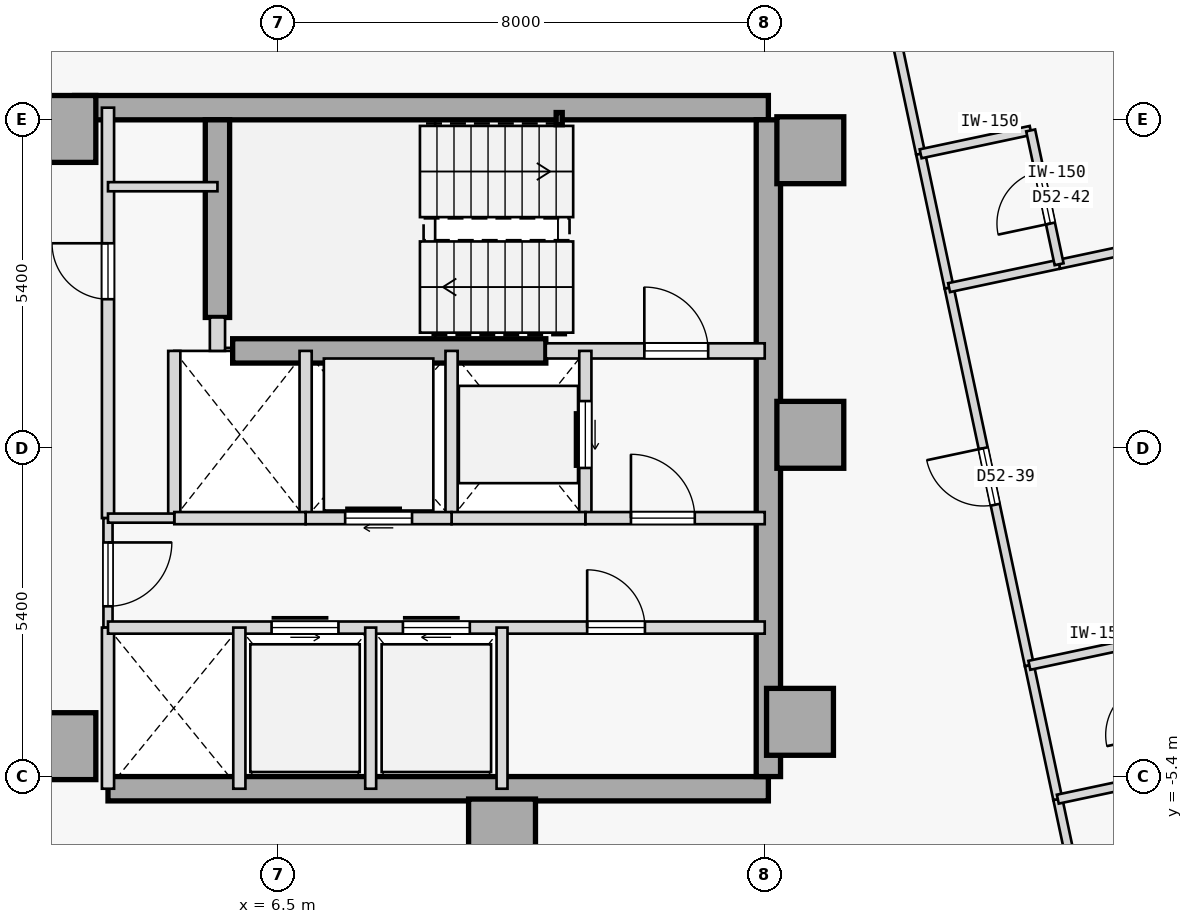
"""IFC4 building model, lengths in metres.
Left out: names, types, materials, properties, quantities, classifications, styles, units other than length and angle.
Written with IfcOpenShell. Run it as: python <this file> out.ifc"""

import sys

from ifc_helpers import new_model, si_unit, direction, frame, frame_2d, origin, origin_2d, place, context, subcontext, project, spatial, rectangle, hollow_rectangle, extrude, element, fill, save


model = new_model("IFC4")
c1 = context("Model", 3, precision=1e-05, world=origin(), true_north=direction((0.0, 1.0)))
c2 = subcontext(c1, "Body", "Model", "MODEL_VIEW")
j1 = project(units=[si_unit("LENGTHUNIT", "METRE"), si_unit("PLANEANGLEUNIT", "RADIAN")], contexts=[c1])
p1 = place(None, origin())
s1 = spatial("IfcSite", under=j1, at=p1, CompositionType="ELEMENT")
p2 = place(p1, origin())
s2 = spatial("IfcBuilding", under=s1, at=p2, CompositionType="ELEMENT")
p3 = place(p2, frame((0.0, 0.0, 199.0)))
s3 = spatial("IfcBuildingStorey", under=s2, at=p3, CompositionType="ELEMENT", Elevation=199.0)
for number, where, z_axis, x_axis in (
    (1, (15.25, 4.9, 0.0), (0.0, 0.0, 1.0), (1.0, 0.0, 0.0)),
    (2, (15.25, 0.22, 0.0), (0.0, 0.0, 1.0), (1.0, 0.0, 0.0)),
    (3, (15.08, -4.5, 0.0), (0.0, 0.0, 1.0), (1.0, 0.0, 0.0)),
    (4, (10.18, -6.32, 0.0), (0.0, 0.0, 1.0), (1.0, 0.0, 0.0)),
    (5, (2.95, -4.9, 0.0), (0.0, 0.0, 1.0), (1.0, 0.0, 0.0)),
    (6, (2.95, 5.25, 0.0), (0.0, 0.0, 1.0), (1.0, 0.0, 0.0)),
):
    element("IfcColumn", number, at=place(p3, frame(where, z_axis=z_axis, x_axis=x_axis)), inside=s3, PredefinedType="COLUMN", context=c2, shape_type="SweptSolid", body=[
        extrude(rectangle(XDim=1.1, YDim=1.1, at=origin_2d()), origin(), (0.0, 0.0, 1.0), 3.4),
    ])
p4 = place(p3, frame((3.15, 5.6, 0.0), z_axis=(0.0, 0.0, 1.0), x_axis=(1.0, 0.0, 0.0)))
e7 = element("IfcWall", 7, at=p4, inside=s3, PredefinedType="SHEAR", context=c2, shape_type="SweptSolid", body=[
    extrude(rectangle(XDim=11.41, YDim=0.4, at=frame_2d((5.705, 0.0))), origin(), (0.0, 0.0, 1.0), 3.0),
])
p5 = place(p3, frame((3.7, -5.6, 0.0), z_axis=(0.0, 0.0, 1.0), x_axis=(1.0, 0.0, 0.0)))
e8 = element("IfcWall", 8, at=p5, inside=s3, PredefinedType="SHEAR", context=c2, shape_type="SweptSolid", body=[
    extrude(rectangle(XDim=10.86, YDim=0.4, at=frame_2d((5.43, 0.0))), origin(), (0.0, 0.0, 1.0), 3.0),
])
p6 = place(p3, frame((14.56, -5.4, 0.0), z_axis=(0.0, 0.0, 1.0), x_axis=(0.0, 1.0, 0.0)))
e9 = element("IfcWall", 9, at=p6, inside=s3, PredefinedType="SHEAR", context=c2, shape_type="SweptSolid", body=[
    extrude(rectangle(XDim=10.8, YDim=0.4, at=frame_2d((5.4, 0.0))), origin(), (0.0, 0.0, 1.0), 3.0),
])
p7 = place(p3, frame((5.5, 2.15, 0.0), z_axis=(0.0, 0.0, 1.0), x_axis=(0.0, 1.0, 0.0)))
e10 = element("IfcWall", 10, at=p7, inside=s3, PredefinedType="SHEAR", context=c2, shape_type="SweptSolid", body=[
    extrude(rectangle(XDim=3.25, YDim=0.4, at=frame_2d((1.625, 0.0))), origin(), (0.0, 0.0, 1.0), 3.0),
])
p8 = place(p3, frame((5.75, 1.6, 0.0), z_axis=(0.0, 0.0, 1.0), x_axis=(1.0, 0.0, 0.0)))
e11 = element("IfcWall", 11, at=p8, inside=s3, PredefinedType="SHEAR", context=c2, shape_type="SweptSolid", body=[
    extrude(rectangle(XDim=5.15, YDim=0.4, at=frame_2d((2.575, 0.0))), origin(), (0.0, 0.0, 1.0), 3.0),
])
p9 = place(p3, frame((11.12, 5.42, 0.0), z_axis=(0.0, 0.0, 1.0), x_axis=(1.0, 0.0, 0.0)))
e12 = element("IfcColumn", 12, at=p9, inside=s3, PredefinedType="COLUMN", context=c2, shape_type="SweptSolid", body=[
    extrude(hollow_rectangle(XDim=0.1, YDim=0.2, WallThickness=0.008, at=origin_2d()), origin(), (0.0, 0.0, 1.0), 3.4),
])
p10 = place(p3, frame((10.9, 1.6, 0.0), z_axis=(0.0, 0.0, 1.0), x_axis=(1.0, 0.0, 0.0)))
e13 = element("IfcWall", 13, at=p10, inside=s3, PredefinedType="STANDARD", context=c2, shape_type="SweptSolid", body=[
    extrude(rectangle(XDim=3.6, YDim=0.25, at=frame_2d((1.8, 0.0))), origin(), (0.0, 0.0, 1.0), 3.0),
])
p11 = place(p10, frame((1.62, 0.0, 0.0)))
e14 = element("IfcOpeningElement", 14, at=p11, cuts=e13, PredefinedType="OPENING", context=c2, shape_type="SweptSolid", body=[
    extrude(rectangle(XDim=1.05, YDim=2.15, at=frame_2d((0.525, 1.075))), frame((0.0, 0.135, 0.0), z_axis=(0.0, -1.0, 0.0), x_axis=(1.0, 0.0, 0.0)), (0.0, 0.0, 1.0), 0.27),
])
p12 = place(p3, frame((5.5, 1.6, 0.0), z_axis=(0.0, 0.0, 1.0), x_axis=(0.0, 1.0, 0.0)))
e15 = element("IfcWall", 15, at=p12, inside=s3, PredefinedType="STANDARD", context=c2, shape_type="SweptSolid", body=[
    extrude(rectangle(XDim=0.55, YDim=0.25, at=frame_2d((0.275, 0.0))), origin(), (0.0, 0.0, 1.0), 3.0),
])
p13 = place(p3, frame((3.7, -1.15, 0.0), z_axis=(0.0, 0.0, 1.0), x_axis=(0.0, 1.0, 0.0)))
e16 = element("IfcWall", 16, at=p13, inside=s3, PredefinedType="STANDARD", context=c2, shape_type="SweptSolid", body=[
    extrude(rectangle(XDim=6.75, YDim=0.2, at=frame_2d((3.375, 0.0))), origin(), (0.0, 0.0, 1.0), 3.0),
])
p14 = place(p13, frame((3.6, 0.0, 0.0)))
e17 = element("IfcOpeningElement", 17, at=p14, cuts=e16, PredefinedType="OPENING", context=c2, shape_type="SweptSolid", body=[
    extrude(rectangle(XDim=0.92, YDim=2.15, at=frame_2d((0.46, 1.075))), frame((0.0, 0.11, 0.0), z_axis=(0.0, -1.0, 0.0), x_axis=(1.0, 0.0, 0.0)), (0.0, 0.0, 1.0), 0.22),
])
p15 = place(p3, frame((3.7, -2.95, 0.0), z_axis=(0.0, 0.0, 1.0), x_axis=(0.0, 1.0, 0.0)))
e18 = element("IfcWall", 18, at=p15, inside=s3, PredefinedType="PARTITIONING", context=c2, shape_type="SweptSolid", body=[
    extrude(rectangle(XDim=1.8, YDim=0.15, at=frame_2d((0.9, 0.0))), origin(), (0.0, 0.0, 1.0), 3.0),
])
p16 = place(p15, frame((0.35, 0.0, 0.0)))
e19 = element("IfcOpeningElement", 19, at=p16, cuts=e18, PredefinedType="OPENING", context=c2, shape_type="SweptSolid", body=[
    extrude(rectangle(XDim=1.05, YDim=2.18, at=frame_2d((0.525, 1.09))), frame((0.0, 0.085, 0.0), z_axis=(0.0, -1.0, 0.0), x_axis=(1.0, 0.0, 0.0)), (0.0, 0.0, 1.0), 0.17),
])
p17 = place(p3, frame((3.7, -5.6, 0.0), z_axis=(0.0, 0.0, 1.0), x_axis=(0.0, 1.0, 0.0)))
e20 = element("IfcWall", 20, at=p17, inside=s3, PredefinedType="STANDARD", context=c2, shape_type="SweptSolid", body=[
    extrude(rectangle(XDim=2.65, YDim=0.2, at=frame_2d((1.325, 0.0))), origin(), (0.0, 0.0, 1.0), 3.0),
])
p18 = place(p3, frame((11.55, -1.15, 0.0), z_axis=(0.0, 0.0, 1.0), x_axis=(0.0, 1.0, 0.0)))
e21 = element("IfcWall", 21, at=p18, inside=s3, PredefinedType="STANDARD", context=c2, shape_type="SweptSolid", body=[
    extrude(rectangle(XDim=2.75, YDim=0.2, at=frame_2d((1.375, 0.0))), origin(), (0.0, 0.0, 1.0), 3.0),
])
p19 = place(p18, frame((0.825, 0.0, 0.0)))
e22 = element("IfcOpeningElement", 22, at=p19, cuts=e21, PredefinedType="OPENING", context=c2, shape_type="SweptSolid", body=[
    extrude(rectangle(XDim=1.1, YDim=2.15, at=frame_2d((0.55, 1.075))), frame((0.0, 0.11, 0.0), z_axis=(0.0, -1.0, 0.0), x_axis=(1.0, 0.0, 0.0)), (0.0, 0.0, 1.0), 0.22),
])
p20 = place(p3, frame((9.35, -1.15, 0.0), z_axis=(0.0, 0.0, 1.0), x_axis=(0.0, 1.0, 0.0)))
e23 = element("IfcWall", 23, at=p20, inside=s3, PredefinedType="STANDARD", context=c2, shape_type="SweptSolid", body=[
    extrude(rectangle(XDim=2.75, YDim=0.2, at=frame_2d((1.375, 0.0))), origin(), (0.0, 0.0, 1.0), 3.0),
])
p21 = place(p3, frame((11.55, -1.15, 0.0), z_axis=(0.0, 0.0, 1.0), x_axis=(1.0, 0.0, 0.0)))
e24 = element("IfcWall", 24, at=p21, inside=s3, PredefinedType="STANDARD", context=c2, shape_type="SweptSolid", body=[
    extrude(rectangle(XDim=2.95, YDim=0.2, at=frame_2d((1.475, 0.0))), origin(), (0.0, 0.0, 1.0), 3.0),
])
p22 = place(p21, frame((0.75, 0.0, 0.0)))
e25 = element("IfcOpeningElement", 25, at=p22, cuts=e24, PredefinedType="OPENING", context=c2, shape_type="SweptSolid", body=[
    extrude(rectangle(XDim=1.05, YDim=2.18, at=frame_2d((0.525, 1.09))), frame((0.0, 0.11, 0.0), z_axis=(0.0, -1.0, 0.0), x_axis=(1.0, 0.0, 0.0)), (0.0, 0.0, 1.0), 0.22),
])
p23 = place(p3, frame((9.35, -1.15, 0.0), z_axis=(0.0, 0.0, 1.0), x_axis=(1.0, 0.0, 0.0)))
e26 = element("IfcWall", 26, at=p23, inside=s3, PredefinedType="STANDARD", context=c2, shape_type="SweptSolid", body=[
    extrude(rectangle(XDim=2.2, YDim=0.2, at=frame_2d((1.1, 0.0))), origin(), (0.0, 0.0, 1.0), 3.0),
])
p24 = place(p3, frame((6.95, -1.15, 0.0), z_axis=(0.0, 0.0, 1.0), x_axis=(0.0, 1.0, 0.0)))
e27 = element("IfcWall", 27, at=p24, inside=s3, PredefinedType="STANDARD", context=c2, shape_type="SweptSolid", body=[
    extrude(rectangle(XDim=2.75, YDim=0.2, at=frame_2d((1.375, 0.0))), origin(), (0.0, 0.0, 1.0), 3.0),
])
p25 = place(p3, frame((6.95, -1.15, 0.0), z_axis=(0.0, 0.0, 1.0), x_axis=(1.0, 0.0, 0.0)))
e28 = element("IfcWall", 28, at=p25, inside=s3, PredefinedType="STANDARD", context=c2, shape_type="SweptSolid", body=[
    extrude(rectangle(XDim=2.4, YDim=0.2, at=frame_2d((1.2, 0.0))), origin(), (0.0, 0.0, 1.0), 3.0),
])
p26 = place(p25, frame((0.65, 0.0, 0.0)))
e29 = element("IfcOpeningElement", 29, at=p26, cuts=e28, PredefinedType="OPENING", context=c2, shape_type="SweptSolid", body=[
    extrude(rectangle(XDim=1.1, YDim=2.15, at=frame_2d((0.55, 1.075))), frame((0.0, 0.11, 0.0), z_axis=(0.0, -1.0, 0.0), x_axis=(1.0, 0.0, 0.0)), (0.0, 0.0, 1.0), 0.22),
])
p27 = place(p3, frame((4.79, -1.15, 0.0), z_axis=(0.0, 0.0, 1.0), x_axis=(0.0, 1.0, 0.0)))
e30 = element("IfcWall", 30, at=p27, inside=s3, PredefinedType="STANDARD", context=c2, shape_type="SweptSolid", body=[
    extrude(rectangle(XDim=2.75, YDim=0.2, at=frame_2d((1.375, 0.0))), origin(), (0.0, 0.0, 1.0), 3.0),
])
p28 = place(p3, frame((4.79, -1.15, 0.0), z_axis=(0.0, 0.0, 1.0), x_axis=(1.0, 0.0, 0.0)))
e31 = element("IfcWall", 31, at=p28, inside=s3, PredefinedType="STANDARD", context=c2, shape_type="SweptSolid", body=[
    extrude(rectangle(XDim=2.16, YDim=0.2, at=frame_2d((1.08, 0.0))), origin(), (0.0, 0.0, 1.0), 3.0),
])
p29 = place(p3, frame((3.7, -1.15, 0.0), z_axis=(0.0, 0.0, 1.0), x_axis=(1.0, 0.0, 0.0)))
e32 = element("IfcWall", 32, at=p29, inside=s3, PredefinedType="PARTITIONING", context=c2, shape_type="SweptSolid", body=[
    extrude(rectangle(XDim=1.09, YDim=0.15, at=frame_2d((0.545, 0.0))), origin(), (0.0, 0.0, 1.0), 3.0),
])
p30 = place(p3, frame((3.7, -2.95, 0.0), z_axis=(0.0, 0.0, 1.0), x_axis=(1.0, 0.0, 0.0)))
e33 = element("IfcWall", 33, at=p30, inside=s3, PredefinedType="STANDARD", context=c2, shape_type="SweptSolid", body=[
    extrude(rectangle(XDim=10.8, YDim=0.2, at=frame_2d((5.4, 0.0))), origin(), (0.0, 0.0, 1.0), 3.0),
])
p31 = place(p30, frame((2.69, 0.0, 0.0)))
e34 = element("IfcOpeningElement", 34, at=p31, cuts=e33, PredefinedType="OPENING", context=c2, shape_type="SweptSolid", body=[
    extrude(rectangle(XDim=1.1, YDim=2.15, at=frame_2d((0.55, 1.075))), frame((0.0, 0.11, 0.0), z_axis=(0.0, -1.0, 0.0), x_axis=(1.0, 0.0, 0.0)), (0.0, 0.0, 1.0), 0.22),
])
p32 = place(p30, frame((4.85, 0.0, 0.0)))
e35 = element("IfcOpeningElement", 35, at=p32, cuts=e33, PredefinedType="OPENING", context=c2, shape_type="SweptSolid", body=[
    extrude(rectangle(XDim=1.1, YDim=2.15, at=frame_2d((0.55, 1.075))), frame((0.0, 0.11, 0.0), z_axis=(0.0, -1.0, 0.0), x_axis=(1.0, 0.0, 0.0)), (0.0, 0.0, 1.0), 0.22),
])
p33 = place(p30, frame((7.88, 0.0, 0.0)))
e36 = element("IfcOpeningElement", 36, at=p33, cuts=e33, PredefinedType="OPENING", context=c2, shape_type="SweptSolid", body=[
    extrude(rectangle(XDim=0.95, YDim=2.15, at=frame_2d((0.475, 1.075))), frame((0.0, 0.11, 0.0), z_axis=(0.0, -1.0, 0.0), x_axis=(1.0, 0.0, 0.0)), (0.0, 0.0, 1.0), 0.22),
])
p34 = place(p3, frame((5.86, -5.6, 0.0), z_axis=(0.0, 0.0, 1.0), x_axis=(0.0, 1.0, 0.0)))
e37 = element("IfcWall", 37, at=p34, inside=s3, PredefinedType="STANDARD", context=c2, shape_type="SweptSolid", body=[
    extrude(rectangle(XDim=2.65, YDim=0.2, at=frame_2d((1.325, 0.0))), origin(), (0.0, 0.0, 1.0), 3.0),
])
for number, where, z_axis, x_axis in (
    (38, (10.18, -5.6, 0.0), (0.0, 0.0, 1.0), (0.0, 1.0, 0.0)),
    (39, (8.02, -5.6, 0.0), (0.0, 0.0, 1.0), (0.0, 1.0, 0.0)),
):
    element("IfcWall", number, at=place(p3, frame(where, z_axis=z_axis, x_axis=x_axis)), inside=s3, PredefinedType="STANDARD", context=c2, shape_type="SweptSolid", body=[
        extrude(rectangle(XDim=2.65, YDim=0.18, at=frame_2d((1.325, 0.0))), origin(), (0.0, 0.0, 1.0), 3.0),
    ])
p35 = place(p3, frame((3.7, 4.3, 0.0), z_axis=(0.0, 0.0, 1.0), x_axis=(1.0, 0.0, 0.0)))
e40 = element("IfcWall", 40, at=p35, inside=s3, PredefinedType="PARTITIONING", context=c2, shape_type="SweptSolid", body=[
    extrude(rectangle(XDim=1.8, YDim=0.15, at=frame_2d((0.9, 0.0))), origin(), (0.0, 0.0, 1.0), 3.0),
])
p36 = place(p3, frame((20.328, -10.515, 0.0), z_axis=(0.0, 0.0, 1.0), x_axis=(-0.207950868925, 0.97813927235, 0.0)))
e41 = element("IfcWall", 41, at=p36, inside=s3, PredefinedType="PARTITIONING", context=c2, shape_type="SweptSolid", body=[
    extrude(rectangle(XDim=4.85, YDim=0.15, at=frame_2d((2.425, 0.0))), origin(), (0.0, 0.0, 1.0), 3.0),
])
p37 = place(p36, frame((1.95, 0.0, 0.0)))
e42 = element("IfcOpeningElement", 42, at=p37, cuts=e41, PredefinedType="OPENING", context=c2, shape_type="SweptSolid", body=[
    extrude(rectangle(XDim=0.95, YDim=2.15, at=frame_2d((0.475, 1.075))), frame((0.0, 0.085, 0.0), z_axis=(0.0, -1.0, 0.0), x_axis=(1.0, 0.0, 0.0)), (0.0, 0.0, 1.0), 0.17),
])
p38 = place(p3, frame((18.852, -3.571, 0.0), z_axis=(0.0, 0.0, 1.0), x_axis=(-0.207879907349, 0.978154355979, 0.0)))
e43 = element("IfcWall", 43, at=p38, inside=s3, PredefinedType="PARTITIONING", context=c2, shape_type="SweptSolid", body=[
    extrude(rectangle(XDim=6.35, YDim=0.15, at=frame_2d((3.175, 0.0))), origin(), (0.0, 0.0, 1.0), 3.0),
])
p39 = place(p38, frame((2.7, 0.0, 0.0)))
e44 = element("IfcOpeningElement", 44, at=p39, cuts=e43, PredefinedType="OPENING", context=c2, shape_type="SweptSolid", body=[
    extrude(rectangle(XDim=0.95, YDim=2.15, at=frame_2d((0.475, 1.075))), frame((0.0, 0.085, 0.0), z_axis=(0.0, -1.0, 0.0), x_axis=(1.0, 0.0, 0.0)), (0.0, 0.0, 1.0), 0.17),
])
p40 = place(p3, frame((19.32, -5.771, 0.0), z_axis=(0.0, 0.0, 1.0), x_axis=(-0.207913264065, 0.978147266328, 0.0)))
e45 = element("IfcWall", 45, at=p40, inside=s3, PredefinedType="PARTITIONING", context=c2, shape_type="SweptSolid", body=[
    extrude(rectangle(XDim=2.25, YDim=0.15, at=frame_2d((1.125, 0.0))), origin(), (0.0, 0.0, 1.0), 3.0),
])
p41 = place(p3, frame((17.064, 4.841, 0.0), z_axis=(0.0, 0.0, 1.0), x_axis=(-0.207924511115, 0.978144875608, 0.0)))
e46 = element("IfcWall", 46, at=p41, inside=s3, PredefinedType="PARTITIONING", context=c2, shape_type="SweptSolid", body=[
    extrude(rectangle(XDim=6.35, YDim=0.15, at=frame_2d((3.175, 0.0))), origin(), (0.0, 0.0, 1.0), 3.0),
])
p42 = place(p41, frame((2.7, 0.0, 0.0)))
e47 = element("IfcOpeningElement", 47, at=p42, cuts=e46, PredefinedType="OPENING", context=c2, shape_type="SweptSolid", body=[
    extrude(rectangle(XDim=0.95, YDim=2.15, at=frame_2d((0.475, 1.075))), frame((0.0, 0.085, 0.0), z_axis=(0.0, -1.0, 0.0), x_axis=(1.0, 0.0, 0.0)), (0.0, 0.0, 1.0), 0.17),
])
p43 = place(p3, frame((17.532, 2.641, 0.0), z_axis=(0.0, 0.0, 1.0), x_axis=(-0.207913264065, 0.978147266328, 0.0)))
e48 = element("IfcWall", 48, at=p43, inside=s3, PredefinedType="PARTITIONING", context=c2, shape_type="SweptSolid", body=[
    extrude(rectangle(XDim=2.25, YDim=0.15, at=frame_2d((1.125, 0.0))), origin(), (0.0, 0.0, 1.0), 3.0),
])
p44 = place(p3, frame((19.32, -5.771, 0.0), z_axis=(0.0, 0.0, 1.0), x_axis=(0.978165892835, 0.207825614625, 0.0)))
e49 = element("IfcWall", 49, at=p44, inside=s3, PredefinedType="PARTITIONING", context=c2, shape_type="SweptSolid", body=[
    extrude(rectangle(XDim=1.85, YDim=0.15, at=frame_2d((0.925, 0.0))), origin(), (0.0, 0.0, 1.0), 3.0),
])
p45 = place(p3, frame((18.852, -3.571, 0.0), z_axis=(0.0, 0.0, 1.0), x_axis=(0.978139061018, 0.207951862966, 0.0)))
e50 = element("IfcWall", 50, at=p45, inside=s3, PredefinedType="PARTITIONING", context=c2, shape_type="SweptSolid", body=[
    extrude(rectangle(XDim=1.85, YDim=0.15, at=frame_2d((0.925, 0.0))), origin(), (0.0, 0.0, 1.0), 3.0),
])
p46 = place(p3, frame((19.341, 3.025, 0.0), z_axis=(0.0, 0.0, 1.0), x_axis=(0.97814556055, 0.207921288896, 0.0)))
e51 = element("IfcWall", 51, at=p46, inside=s3, PredefinedType="PARTITIONING", context=c2, shape_type="SweptSolid", body=[
    extrude(rectangle(XDim=12.187, YDim=0.15, at=frame_2d((6.094, 0.0))), origin(), (0.0, 0.0, 1.0), 2.55),
])
p47 = place(p3, frame((17.532, 2.641, 0.0), z_axis=(0.0, 0.0, 1.0), x_axis=(0.978160192495, 0.207852442415, 0.0)))
e52 = element("IfcWall", 52, at=p47, inside=s3, PredefinedType="PARTITIONING", context=c2, shape_type="SweptSolid", body=[
    extrude(rectangle(XDim=1.85, YDim=0.15, at=frame_2d((0.925, 0.0))), origin(), (0.0, 0.0, 1.0), 3.0),
])
p48 = place(p3, frame((17.064, 4.841, 0.0), z_axis=(0.0, 0.0, 1.0), x_axis=(0.978133353907, 0.20797870558, 0.0)))
e53 = element("IfcWall", 53, at=p48, inside=s3, PredefinedType="PARTITIONING", context=c2, shape_type="SweptSolid", body=[
    extrude(rectangle(XDim=1.85, YDim=0.15, at=frame_2d((0.925, 0.0))), origin(), (0.0, 0.0, 1.0), 3.0),
])
p49 = place(p3, frame((19.341, 3.025, 0.0), z_axis=(0.0, 0.0, 1.0), x_axis=(-0.207891197838, 0.978151956427, 0.0)))
e54 = element("IfcWall", 54, at=p49, inside=s3, PredefinedType="PARTITIONING", context=c2, shape_type="SweptSolid", body=[
    extrude(rectangle(XDim=2.25, YDim=0.15, at=frame_2d((1.125, 0.0))), origin(), (0.0, 0.0, 1.0), 3.0),
])
p50 = place(p49, frame((0.685, 0.0, 0.0)))
e55 = element("IfcOpeningElement", 55, at=p50, cuts=e54, PredefinedType="OPENING", context=c2, shape_type="SweptSolid", body=[
    extrude(rectangle(XDim=0.88, YDim=2.15, at=frame_2d((0.44, 1.075))), frame((0.0, 0.085, 0.0), z_axis=(0.0, -1.0, 0.0), x_axis=(1.0, 0.0, 0.0)), (0.0, 0.0, 1.0), 0.17),
])
p51 = place(p11, origin())
e56 = element("IfcDoor", 56, at=p51, inside=s3, OperationType="SINGLE_SWING_LEFT", PredefinedType="DOOR", context=c2, shape_type="SweptSolid", body=[
    extrude(rectangle(XDim=1.05, YDim=2.15, at=frame_2d((0.525, 1.075))), frame((0.0, 0.025, 0.0), z_axis=(0.0, -1.0, 0.0), x_axis=(1.0, 0.0, 0.0)), (0.0, 0.0, 1.0), 0.05),
])
fill(e14, e56)
p52 = place(p22, origin())
e57 = element("IfcDoor", 57, at=p52, inside=s3, OperationType="SINGLE_SWING_LEFT", PredefinedType="DOOR", context=c2, shape_type="SweptSolid", body=[
    extrude(rectangle(XDim=1.05, YDim=2.18, at=frame_2d((0.525, 1.09))), frame((0.0, 0.025, 0.0), z_axis=(0.0, -1.0, 0.0), x_axis=(1.0, 0.0, 0.0)), (0.0, 0.0, 1.0), 0.05),
])
fill(e25, e57)
p53 = place(p16, frame((1.05, 0.0, 0.0), z_axis=(0.0, 0.0, 1.0), x_axis=(-1.0, 0.0, 0.0)))
e58 = element("IfcDoor", 58, at=p53, inside=s3, OperationType="SINGLE_SWING_RIGHT", PredefinedType="DOOR", context=c2, shape_type="SweptSolid", body=[
    extrude(rectangle(XDim=1.05, YDim=2.18, at=frame_2d((0.525, 1.09))), frame((0.0, 0.025, 0.0), z_axis=(0.0, -1.0, 0.0), x_axis=(1.0, 0.0, 0.0)), (0.0, 0.0, 1.0), 0.05),
])
fill(e19, e58)
p54 = place(p19, origin())
e59 = element("IfcDoor", 59, at=p54, inside=s3, OperationType="SLIDING_TO_RIGHT", PredefinedType="DOOR", context=c2, shape_type="SweptSolid", body=[
    extrude(rectangle(XDim=1.1, YDim=2.15, at=frame_2d((0.55, 1.075))), frame((0.0, 0.025, 0.0), z_axis=(0.0, -1.0, 0.0), x_axis=(1.0, 0.0, 0.0)), (0.0, 0.0, 1.0), 0.05),
])
fill(e22, e59)
p55 = place(p26, origin())
e60 = element("IfcDoor", 60, at=p55, inside=s3, OperationType="SLIDING_TO_RIGHT", PredefinedType="DOOR", context=c2, shape_type="SweptSolid", body=[
    extrude(rectangle(XDim=1.1, YDim=2.15, at=frame_2d((0.55, 1.075))), frame((0.0, 0.025, 0.0), z_axis=(0.0, -1.0, 0.0), x_axis=(1.0, 0.0, 0.0)), (0.0, 0.0, 1.0), 0.05),
])
fill(e29, e60)
p56 = place(p31, origin())
e61 = element("IfcDoor", 61, at=p56, inside=s3, OperationType="SLIDING_TO_LEFT", PredefinedType="DOOR", context=c2, shape_type="SweptSolid", body=[
    extrude(rectangle(XDim=1.1, YDim=2.15, at=frame_2d((0.55, 1.075))), frame((0.0, 0.025, 0.0), z_axis=(0.0, -1.0, 0.0), x_axis=(1.0, 0.0, 0.0)), (0.0, 0.0, 1.0), 0.05),
])
fill(e34, e61)
p57 = place(p32, origin())
e62 = element("IfcDoor", 62, at=p57, inside=s3, OperationType="SLIDING_TO_RIGHT", PredefinedType="DOOR", context=c2, shape_type="SweptSolid", body=[
    extrude(rectangle(XDim=1.1, YDim=2.15, at=frame_2d((0.55, 1.075))), frame((0.0, 0.025, 0.0), z_axis=(0.0, -1.0, 0.0), x_axis=(1.0, 0.0, 0.0)), (0.0, 0.0, 1.0), 0.05),
])
fill(e35, e62)
p58 = place(p33, origin())
e63 = element("IfcDoor", 63, at=p58, inside=s3, OperationType="SINGLE_SWING_LEFT", PredefinedType="DOOR", context=c2, shape_type="SweptSolid", body=[
    extrude(rectangle(XDim=0.95, YDim=2.15, at=frame_2d((0.475, 1.075))), frame((0.0, 0.025, 0.0), z_axis=(0.0, -1.0, 0.0), x_axis=(1.0, 0.0, 0.0)), (0.0, 0.0, 1.0), 0.05),
])
fill(e36, e63)
p59 = place(p14, origin())
e64 = element("IfcDoor", 64, at=p59, inside=s3, OperationType="SINGLE_SWING_RIGHT", PredefinedType="DOOR", context=c2, shape_type="SweptSolid", body=[
    extrude(rectangle(XDim=0.92, YDim=2.15, at=frame_2d((0.46, 1.075))), frame((0.0, 0.025, 0.0), z_axis=(0.0, -1.0, 0.0), x_axis=(1.0, 0.0, 0.0)), (0.0, 0.0, 1.0), 0.05),
])
fill(e17, e64)
p60 = place(p39, origin())
e65 = element("IfcDoor", 65, at=p60, inside=s3, OperationType="SINGLE_SWING_RIGHT", PredefinedType="DOOR", context=c2, shape_type="SweptSolid", body=[
    extrude(rectangle(XDim=0.95, YDim=2.15, at=frame_2d((0.475, 1.075))), frame((0.0, 0.025, 0.0), z_axis=(0.0, -1.0, 0.0), x_axis=(1.0, 0.0, 0.0)), (0.0, 0.0, 1.0), 0.05),
])
fill(e44, e65)
p61 = place(p50, origin())
e66 = element("IfcDoor", 66, at=p61, inside=s3, OperationType="SINGLE_SWING_LEFT", PredefinedType="DOOR", context=c2, shape_type="SweptSolid", body=[
    extrude(rectangle(XDim=0.88, YDim=2.15, at=frame_2d((0.44, 1.075))), frame((0.0, 0.025, 0.0), z_axis=(0.0, -1.0, 0.0), x_axis=(1.0, 0.0, 0.0)), (0.0, 0.0, 1.0), 0.05),
])
fill(e55, e66)
save(model, sys.argv[1])
